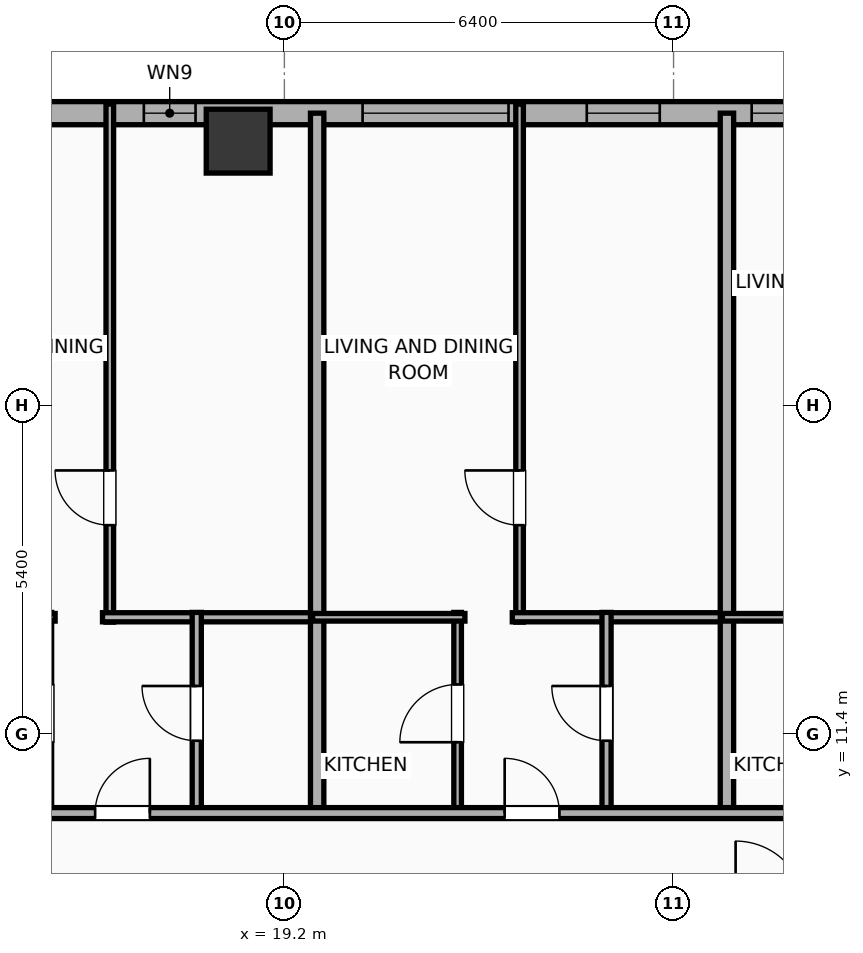
"""IFC4 building model, lengths in metres.
Left out: names, types, materials, properties, quantities, classifications, styles, units other than length and angle.
Written with IfcOpenShell. Run it as: python <this file> out.ifc"""

import sys

from ifc_helpers import new_model, si_unit, direction, frame, frame_2d, origin, origin_2d, place, context, subcontext, project, spatial, rectangle, hollow_rectangle, extrude, element, fill, save


model = new_model("IFC4")
c1 = context("Model", 3, precision=1e-05, world=origin(), true_north=direction((0.0, 1.0)))
c2 = subcontext(c1, "Body", "Model", "MODEL_VIEW")
j1 = project(units=[si_unit("LENGTHUNIT", "METRE"), si_unit("PLANEANGLEUNIT", "RADIAN")], contexts=[c1])
p1 = place(None, origin())
s1 = spatial("IfcSite", under=j1, at=p1, CompositionType="ELEMENT")
p2 = place(p1, origin())
s2 = spatial("IfcBuilding", under=s1, at=p2, CompositionType="ELEMENT")
p3 = place(p2, frame((0.0, 0.0, 124.8)))
s3 = spatial("IfcBuildingStorey", under=s2, at=p3, CompositionType="ELEMENT", Elevation=124.8)
p4 = place(p3, frame((18.44, 21.15, 0.0), z_axis=(0.0, 0.0, 1.0), x_axis=(1.0, 0.0, 0.0)))
e1 = element("IfcColumn", 1, at=p4, inside=s3, PredefinedType="COLUMN", context=c2, shape_type="SweptSolid", body=[
    extrude(hollow_rectangle(XDim=1.05, YDim=1.05, WallThickness=0.036, at=origin_2d()), origin(), (0.0, 0.0, 1.0), 3.9),
])
p5 = place(p3, frame((-25.381, 21.61, 0.0), z_axis=(0.0, 0.0, 1.0), x_axis=(1.0, 0.0, 0.0)))
e2 = element("IfcWall", 2, at=p5, inside=s3, PredefinedType="ELEMENTEDWALL", context=c2, shape_type="SweptSolid", body=[
    extrude(rectangle(XDim=54.763, YDim=0.38, at=frame_2d((27.381, 0.0))), origin(), (0.0, 0.0, 1.0), 3.65),
])
p6 = place(p5, frame((4.795, 0.0, 0.75)))
e3 = element("IfcOpeningElement", 3, at=p6, cuts=e2, PredefinedType="OPENING", context=c2, shape_type="SweptSolid", body=[
    extrude(rectangle(XDim=2.4, YDim=2.1, at=frame_2d((1.2, 1.05))), frame((0.0, 0.2, 0.0), z_axis=(0.0, -1.0, 0.0), x_axis=(1.0, 0.0, 0.0)), (0.0, 0.0, 1.0), 0.4),
])
p7 = place(p5, frame((45.867, 0.0, 0.75)))
e4 = element("IfcOpeningElement", 4, at=p7, cuts=e2, PredefinedType="OPENING", context=c2, shape_type="SweptSolid", body=[
    extrude(rectangle(XDim=2.4, YDim=2.1, at=frame_2d((1.2, 1.05))), frame((0.0, 0.2, 0.0), z_axis=(0.0, -1.0, 0.0), x_axis=(1.0, 0.0, 0.0)), (0.0, 0.0, 1.0), 0.4),
])
p8 = place(p5, frame((2.408, 0.0, 0.75)))
e5 = element("IfcOpeningElement", 5, at=p8, cuts=e2, PredefinedType="OPENING", context=c2, shape_type="SweptSolid", body=[
    extrude(rectangle(XDim=1.2, YDim=2.05, at=frame_2d((0.6, 1.025))), frame((0.0, 0.2, 0.0), z_axis=(0.0, -1.0, 0.0), x_axis=(1.0, 0.0, 0.0)), (0.0, 0.0, 1.0), 0.4),
])
p9 = place(p5, frame((8.952, 0.0, 0.75)))
e6 = element("IfcOpeningElement", 6, at=p9, cuts=e2, PredefinedType="OPENING", context=c2, shape_type="SweptSolid", body=[
    extrude(rectangle(XDim=1.2, YDim=2.05, at=frame_2d((0.6, 1.025))), frame((0.0, 0.2, 0.0), z_axis=(0.0, -1.0, 0.0), x_axis=(1.0, 0.0, 0.0)), (0.0, 0.0, 1.0), 0.4),
])
p10 = place(p5, frame((17.132, 0.0, 0.75)))
e7 = element("IfcOpeningElement", 7, at=p10, cuts=e2, PredefinedType="OPENING", context=c2, shape_type="SweptSolid", body=[
    extrude(rectangle(XDim=1.2, YDim=2.05, at=frame_2d((0.6, 1.025))), frame((0.0, 0.2, 0.0), z_axis=(0.0, -1.0, 0.0), x_axis=(1.0, 0.0, 0.0)), (0.0, 0.0, 1.0), 0.4),
])
p11 = place(p5, frame((14.007, 0.0, 0.75)))
e8 = element("IfcOpeningElement", 8, at=p11, cuts=e2, PredefinedType="OPENING", context=c2, shape_type="SweptSolid", body=[
    extrude(rectangle(XDim=1.2, YDim=2.05, at=frame_2d((0.6, 1.025))), frame((0.0, 0.2, 0.0), z_axis=(0.0, -1.0, 0.0), x_axis=(1.0, 0.0, 0.0)), (0.0, 0.0, 1.0), 0.4),
])
p12 = place(p5, frame((22.636, 0.0, 0.75)))
e9 = element("IfcOpeningElement", 9, at=p12, cuts=e2, PredefinedType="OPENING", context=c2, shape_type="SweptSolid", body=[
    extrude(rectangle(XDim=1.2, YDim=2.05, at=frame_2d((0.6, 1.025))), frame((0.0, 0.2, 0.0), z_axis=(0.0, -1.0, 0.0), x_axis=(1.0, 0.0, 0.0)), (0.0, 0.0, 1.0), 0.4),
])
p13 = place(p5, frame((27.129, 0.0, 0.75)))
e10 = element("IfcOpeningElement", 10, at=p13, cuts=e2, PredefinedType="OPENING", context=c2, shape_type="SweptSolid", body=[
    extrude(rectangle(XDim=1.2, YDim=2.05, at=frame_2d((0.6, 1.025))), frame((0.0, 0.2, 0.0), z_axis=(0.0, -1.0, 0.0), x_axis=(1.0, 0.0, 0.0)), (0.0, 0.0, 1.0), 0.4),
])
p14 = place(p5, frame((30.254, 0.0, 0.75)))
e11 = element("IfcOpeningElement", 11, at=p14, cuts=e2, PredefinedType="OPENING", context=c2, shape_type="SweptSolid", body=[
    extrude(rectangle(XDim=1.2, YDim=2.05, at=frame_2d((0.6, 1.025))), frame((0.0, 0.2, 0.0), z_axis=(0.0, -1.0, 0.0), x_axis=(1.0, 0.0, 0.0)), (0.0, 0.0, 1.0), 0.4),
])
p15 = place(p5, frame((33.603, 0.0, 0.75)))
e12 = element("IfcOpeningElement", 12, at=p15, cuts=e2, PredefinedType="OPENING", context=c2, shape_type="SweptSolid", body=[
    extrude(rectangle(XDim=1.2, YDim=2.05, at=frame_2d((0.6, 1.025))), frame((0.0, 0.2, 0.0), z_axis=(0.0, -1.0, 0.0), x_axis=(1.0, 0.0, 0.0)), (0.0, 0.0, 1.0), 0.4),
])
p16 = place(p5, frame((36.608, 0.0, 0.75)))
e13 = element("IfcOpeningElement", 13, at=p16, cuts=e2, PredefinedType="OPENING", context=c2, shape_type="SweptSolid", body=[
    extrude(rectangle(XDim=1.2, YDim=2.05, at=frame_2d((0.6, 1.025))), frame((0.0, 0.2, 0.0), z_axis=(0.0, -1.0, 0.0), x_axis=(1.0, 0.0, 0.0)), (0.0, 0.0, 1.0), 0.4),
])
p17 = place(p5, frame((39.446, 0.0, 0.75)))
e14 = element("IfcOpeningElement", 14, at=p17, cuts=e2, PredefinedType="OPENING", context=c2, shape_type="SweptSolid", body=[
    extrude(rectangle(XDim=1.2, YDim=2.05, at=frame_2d((0.6, 1.025))), frame((0.0, 0.2, 0.0), z_axis=(0.0, -1.0, 0.0), x_axis=(1.0, 0.0, 0.0)), (0.0, 0.0, 1.0), 0.4),
])
p18 = place(p5, frame((42.27, 0.0, 0.75)))
e15 = element("IfcOpeningElement", 15, at=p18, cuts=e2, PredefinedType="OPENING", context=c2, shape_type="SweptSolid", body=[
    extrude(rectangle(XDim=0.85, YDim=2.05, at=frame_2d((0.425, 1.025))), frame((0.0, 0.2, 0.0), z_axis=(0.0, -1.0, 0.0), x_axis=(1.0, 0.0, 0.0)), (0.0, 0.0, 1.0), 0.4),
])
p19 = place(p5, frame((49.554, 0.0, 0.75)))
e16 = element("IfcOpeningElement", 16, at=p19, cuts=e2, PredefinedType="OPENING", context=c2, shape_type="SweptSolid", body=[
    extrude(rectangle(XDim=1.2, YDim=2.05, at=frame_2d((0.6, 1.025))), frame((0.0, 0.2, 0.0), z_axis=(0.0, -1.0, 0.0), x_axis=(1.0, 0.0, 0.0)), (0.0, 0.0, 1.0), 0.4),
])
p20 = place(p5, frame((52.266, 0.0, 0.75)))
e17 = element("IfcOpeningElement", 17, at=p20, cuts=e2, PredefinedType="OPENING", context=c2, shape_type="SweptSolid", body=[
    extrude(rectangle(XDim=1.2, YDim=2.05, at=frame_2d((0.6, 1.025))), frame((0.0, 0.2, 0.0), z_axis=(0.0, -1.0, 0.0), x_axis=(1.0, 0.0, 0.0)), (0.0, 0.0, 1.0), 0.4),
])
p21 = place(p3, frame((16.329, 13.24, 0.0), z_axis=(0.0, 0.0, 1.0), x_axis=(0.0, 1.0, 0.0)))
e18 = element("IfcWall", 18, at=p21, inside=s3, PredefinedType="PARTITIONING", context=c2, shape_type="SweptSolid", body=[
    extrude(rectangle(XDim=8.52, YDim=0.125, at=frame_2d((4.26, 0.0))), origin(), (0.0, 0.0, 1.0), 3.65),
])
p22 = place(p21, frame((1.595, 0.0, 0.0)))
e19 = element("IfcOpeningElement", 19, at=p22, cuts=e18, PredefinedType="OPENING", context=c2, shape_type="SweptSolid", body=[
    extrude(rectangle(XDim=0.9, YDim=2.05, at=frame_2d((0.45, 1.025))), frame((0.0, 0.073, 0.0), z_axis=(0.0, -1.0, 0.0), x_axis=(1.0, 0.0, 0.0)), (0.0, 0.0, 1.0), 0.145),
])
p23 = place(p3, frame((16.209, 13.32, 0.0), z_axis=(0.0, 0.0, 1.0), x_axis=(1.0, 0.0, 0.0)))
e20 = element("IfcWall", 20, at=p23, inside=s3, PredefinedType="PLUMBINGWALL", context=c2, shape_type="SweptSolid", body=[
    extrude(rectangle(XDim=3.605, YDim=0.15, at=frame_2d((1.802, 0.0))), origin(), (0.0, 0.0, 1.0), 3.65),
])
p24 = place(p3, frame((12.74, 13.32, 0.0), z_axis=(0.0, 0.0, 1.0), x_axis=(1.0, 0.0, 0.0)))
e21 = element("IfcWall", 21, at=p24, inside=s3, PredefinedType="PARTITIONING", context=c2, shape_type="SweptSolid", body=[
    extrude(rectangle(XDim=2.69, YDim=0.125, at=frame_2d((1.345, 0.0))), origin(), (0.0, 0.0, 1.0), 3.65),
])
p25 = place(p3, frame((17.759, 10.08, 0.0), z_axis=(0.0, 0.0, 1.0), x_axis=(0.0, 1.0, 0.0)))
e22 = element("IfcWall", 22, at=p25, inside=s3, PredefinedType="PLUMBINGWALL", context=c2, shape_type="SweptSolid", body=[
    extrude(rectangle(XDim=3.32, YDim=0.15, at=frame_2d((1.66, 0.0))), origin(), (0.0, 0.0, 1.0), 3.65),
])
p26 = place(p25, frame((1.21, 0.0, 0.0)))
e23 = element("IfcOpeningElement", 23, at=p26, cuts=e22, PredefinedType="OPENING", context=c2, shape_type="SweptSolid", body=[
    extrude(rectangle(XDim=0.9, YDim=2.05, at=frame_2d((0.45, 1.025))), frame((0.0, 0.085, 0.0), z_axis=(0.0, -1.0, 0.0), x_axis=(1.0, 0.0, 0.0)), (0.0, 0.0, 1.0), 0.17),
])
p27 = place(p3, frame((19.739, 10.02, 0.0), z_axis=(0.0, 0.0, 1.0), x_axis=(0.0, 1.0, 0.0)))
e24 = element("IfcWall", 24, at=p27, inside=s3, PredefinedType="PARTITIONING", context=c2, shape_type="SweptSolid", body=[
    extrude(rectangle(XDim=11.59, YDim=0.22, at=frame_2d((5.795, 0.0))), origin(), (0.0, 0.0, 1.0), 3.65),
])
p28 = place(p3, frame((23.068, 13.24, 0.0), z_axis=(0.0, 0.0, 1.0), x_axis=(0.0, 1.0, 0.0)))
e25 = element("IfcWall", 25, at=p28, inside=s3, PredefinedType="PARTITIONING", context=c2, shape_type="SweptSolid", body=[
    extrude(rectangle(XDim=8.52, YDim=0.125, at=frame_2d((4.26, 0.0))), origin(), (0.0, 0.0, 1.0), 3.65),
])
p29 = place(p28, frame((1.595, 0.0, 0.0)))
e26 = element("IfcOpeningElement", 26, at=p29, cuts=e25, PredefinedType="OPENING", context=c2, shape_type="SweptSolid", body=[
    extrude(rectangle(XDim=0.9, YDim=2.05, at=frame_2d((0.45, 1.025))), frame((0.0, 0.073, 0.0), z_axis=(0.0, -1.0, 0.0), x_axis=(1.0, 0.0, 0.0)), (0.0, 0.0, 1.0), 0.145),
])
p30 = place(p3, frame((22.948, 13.32, 0.0), z_axis=(0.0, 0.0, 1.0), x_axis=(1.0, 0.0, 0.0)))
e27 = element("IfcWall", 27, at=p30, inside=s3, PredefinedType="PLUMBINGWALL", context=c2, shape_type="SweptSolid", body=[
    extrude(rectangle(XDim=3.605, YDim=0.15, at=frame_2d((1.802, 0.0))), origin(), (0.0, 0.0, 1.0), 3.65),
])
p31 = place(p3, frame((22.049, 10.08, 0.0), z_axis=(0.0, 0.0, 1.0), x_axis=(0.0, 1.0, 0.0)))
e28 = element("IfcWall", 28, at=p31, inside=s3, PredefinedType="PARTITIONING", context=c2, shape_type="SweptSolid", body=[
    extrude(rectangle(XDim=3.32, YDim=0.125, at=frame_2d((1.66, 0.0))), origin(), (0.0, 0.0, 1.0), 3.65),
])
p32 = place(p31, frame((1.185, 0.0, 0.0)))
e29 = element("IfcOpeningElement", 29, at=p32, cuts=e28, PredefinedType="OPENING", context=c2, shape_type="SweptSolid", body=[
    extrude(rectangle(XDim=0.95, YDim=2.05, at=frame_2d((0.475, 1.025))), frame((0.0, 0.073, 0.0), z_axis=(0.0, -1.0, 0.0), x_axis=(1.0, 0.0, 0.0)), (0.0, 0.0, 1.0), 0.145),
])
p33 = place(p3, frame((19.664, 13.32, 0.0), z_axis=(0.0, 0.0, 1.0), x_axis=(1.0, 0.0, 0.0)))
e30 = element("IfcWall", 30, at=p33, inside=s3, PredefinedType="PARTITIONING", context=c2, shape_type="SweptSolid", body=[
    extrude(rectangle(XDim=2.505, YDim=0.125, at=frame_2d((1.252, 0.0))), origin(), (0.0, 0.0, 1.0), 3.65),
])
p34 = place(p3, frame((24.498, 10.08, 0.0), z_axis=(0.0, 0.0, 1.0), x_axis=(0.0, 1.0, 0.0)))
e31 = element("IfcWall", 31, at=p34, inside=s3, PredefinedType="PLUMBINGWALL", context=c2, shape_type="SweptSolid", body=[
    extrude(rectangle(XDim=3.32, YDim=0.15, at=frame_2d((1.66, 0.0))), origin(), (0.0, 0.0, 1.0), 3.65),
])
p35 = place(p34, frame((1.21, 0.0, 0.0)))
e32 = element("IfcOpeningElement", 32, at=p35, cuts=e31, PredefinedType="OPENING", context=c2, shape_type="SweptSolid", body=[
    extrude(rectangle(XDim=0.9, YDim=2.05, at=frame_2d((0.45, 1.025))), frame((0.0, 0.085, 0.0), z_axis=(0.0, -1.0, 0.0), x_axis=(1.0, 0.0, 0.0)), (0.0, 0.0, 1.0), 0.17),
])
p36 = place(p3, frame((26.478, 10.02, 0.0), z_axis=(0.0, 0.0, 1.0), x_axis=(0.0, 1.0, 0.0)))
e33 = element("IfcWall", 33, at=p36, inside=s3, PredefinedType="PARTITIONING", context=c2, shape_type="SweptSolid", body=[
    extrude(rectangle(XDim=11.59, YDim=0.22, at=frame_2d((5.795, 0.0))), origin(), (0.0, 0.0, 1.0), 3.65),
])
p37 = place(p3, frame((26.403, 13.32, 0.0), z_axis=(0.0, 0.0, 1.0), x_axis=(1.0, 0.0, 0.0)))
e34 = element("IfcWall", 34, at=p37, inside=s3, PredefinedType="PARTITIONING", context=c2, shape_type="SweptSolid", body=[
    extrude(rectangle(XDim=2.505, YDim=0.125, at=frame_2d((1.252, 0.0))), origin(), (0.0, 0.0, 1.0), 3.65),
])
p38 = place(p3, frame((-29.21, 10.1, 0.0), z_axis=(0.0, 0.0, 1.0), x_axis=(1.0, 0.0, 0.0)))
e35 = element("IfcWall", 35, at=p38, inside=s3, PredefinedType="PARTITIONING", context=c2, shape_type="SweptSolid", body=[
    extrude(rectangle(XDim=62.42, YDim=0.18, at=frame_2d((31.21, 0.0))), origin(), (0.0, 0.0, 1.0), 3.65),
])
p39 = place(p38, frame((2.54, 0.0, 0.0)))
e36 = element("IfcOpeningElement", 36, at=p39, cuts=e35, PredefinedType="OPENING", context=c2, shape_type="SweptSolid", body=[
    extrude(rectangle(XDim=0.9, YDim=2.05, at=frame_2d((0.45, 1.025))), frame((0.0, 0.1, 0.0), z_axis=(0.0, -1.0, 0.0), x_axis=(1.0, 0.0, 0.0)), (0.0, 0.0, 1.0), 0.2),
])
p40 = place(p38, frame((9.1, 0.0, 0.0)))
e37 = element("IfcOpeningElement", 37, at=p40, cuts=e35, PredefinedType="OPENING", context=c2, shape_type="SweptSolid", body=[
    extrude(rectangle(XDim=1.15, YDim=2.05, at=frame_2d((0.575, 1.025))), frame((0.0, 0.1, 0.0), z_axis=(0.0, -1.0, 0.0), x_axis=(1.0, 0.0, 0.0)), (0.0, 0.0, 1.0), 0.2),
])
p41 = place(p38, frame((14.063, 0.0, 0.0)))
e38 = element("IfcOpeningElement", 38, at=p41, cuts=e35, PredefinedType="OPENING", context=c2, shape_type="SweptSolid", body=[
    extrude(rectangle(XDim=0.9, YDim=2.05, at=frame_2d((0.45, 1.025))), frame((0.0, 0.1, 0.0), z_axis=(0.0, -1.0, 0.0), x_axis=(1.0, 0.0, 0.0)), (0.0, 0.0, 1.0), 0.2),
])
p42 = place(p38, frame((20.954, 0.0, 0.0)))
e39 = element("IfcOpeningElement", 39, at=p42, cuts=e35, PredefinedType="OPENING", context=c2, shape_type="SweptSolid", body=[
    extrude(rectangle(XDim=1.15, YDim=2.05, at=frame_2d((0.575, 1.025))), frame((0.0, 0.1, 0.0), z_axis=(0.0, -1.0, 0.0), x_axis=(1.0, 0.0, 0.0)), (0.0, 0.0, 1.0), 0.2),
])
p43 = place(p38, frame((26.26, 0.0, 0.0)))
e40 = element("IfcOpeningElement", 40, at=p43, cuts=e35, PredefinedType="OPENING", context=c2, shape_type="SweptSolid", body=[
    extrude(rectangle(XDim=0.9, YDim=2.05, at=frame_2d((0.45, 1.025))), frame((0.0, 0.1, 0.0), z_axis=(0.0, -1.0, 0.0), x_axis=(1.0, 0.0, 0.0)), (0.0, 0.0, 1.0), 0.2),
])
p44 = place(p38, frame((31.01, 0.0, 0.0)))
e41 = element("IfcOpeningElement", 41, at=p44, cuts=e35, PredefinedType="OPENING", context=c2, shape_type="SweptSolid", body=[
    extrude(rectangle(XDim=1.15, YDim=2.05, at=frame_2d((0.575, 1.025))), frame((0.0, 0.1, 0.0), z_axis=(0.0, -1.0, 0.0), x_axis=(1.0, 0.0, 0.0)), (0.0, 0.0, 1.0), 0.2),
])
p45 = place(p38, frame((37.37, 0.0, 0.0)))
e42 = element("IfcOpeningElement", 42, at=p45, cuts=e35, PredefinedType="OPENING", context=c2, shape_type="SweptSolid", body=[
    extrude(rectangle(XDim=1.15, YDim=2.05, at=frame_2d((0.575, 1.025))), frame((0.0, 0.1, 0.0), z_axis=(0.0, -1.0, 0.0), x_axis=(1.0, 0.0, 0.0)), (0.0, 0.0, 1.0), 0.2),
])
p46 = place(p38, frame((45.298, 0.0, 0.0)))
e43 = element("IfcOpeningElement", 43, at=p46, cuts=e35, PredefinedType="OPENING", context=c2, shape_type="SweptSolid", body=[
    extrude(rectangle(XDim=0.9, YDim=2.05, at=frame_2d((0.45, 1.025))), frame((0.0, 0.1, 0.0), z_axis=(0.0, -1.0, 0.0), x_axis=(1.0, 0.0, 0.0)), (0.0, 0.0, 1.0), 0.2),
])
p47 = place(p38, frame((52.033, 0.0, 0.0)))
e44 = element("IfcOpeningElement", 44, at=p47, cuts=e35, PredefinedType="OPENING", context=c2, shape_type="SweptSolid", body=[
    extrude(rectangle(XDim=0.9, YDim=2.05, at=frame_2d((0.45, 1.025))), frame((0.0, 0.1, 0.0), z_axis=(0.0, -1.0, 0.0), x_axis=(1.0, 0.0, 0.0)), (0.0, 0.0, 1.0), 0.2),
])
p48 = place(p38, frame((58.805, 0.0, 0.0)))
e45 = element("IfcOpeningElement", 45, at=p48, cuts=e35, PredefinedType="OPENING", context=c2, shape_type="SweptSolid", body=[
    extrude(rectangle(XDim=0.9, YDim=2.05, at=frame_2d((0.45, 1.025))), frame((0.0, 0.1, 0.0), z_axis=(0.0, -1.0, 0.0), x_axis=(1.0, 0.0, 0.0)), (0.0, 0.0, 1.0), 0.2),
])
p49 = place(p7, origin())
e46 = element("IfcWindow", 46, at=p49, inside=s3, PartitioningType="SINGLE_PANEL", PredefinedType="WINDOW", context=c2, shape_type="SweptSolid", body=[
    extrude(rectangle(XDim=2.4, YDim=2.1, at=frame_2d((1.2, 1.05))), frame((0.0, 0.03, 0.0), z_axis=(0.0, -1.0, 0.0), x_axis=(1.0, 0.0, 0.0)), (0.0, 0.0, 1.0), 0.06),
])
fill(e4, e46)
p50 = place(p18, origin())
e47 = element("IfcWindow", 47, at=p50, inside=s3, PartitioningType="SINGLE_PANEL", PredefinedType="WINDOW", context=c2, shape_type="SweptSolid", body=[
    extrude(rectangle(XDim=0.85, YDim=2.05, at=frame_2d((0.425, 1.025))), frame((0.0, 0.03, 0.0), z_axis=(0.0, -1.0, 0.0), x_axis=(1.0, 0.0, 0.0)), (0.0, 0.0, 1.0), 0.06),
])
fill(e15, e47)
p51 = place(p19, origin())
e48 = element("IfcWindow", 48, at=p51, inside=s3, PartitioningType="SINGLE_PANEL", PredefinedType="WINDOW", context=c2, shape_type="SweptSolid", body=[
    extrude(rectangle(XDim=1.2, YDim=2.05, at=frame_2d((0.6, 1.025))), frame((0.0, 0.03, 0.0), z_axis=(0.0, -1.0, 0.0), x_axis=(1.0, 0.0, 0.0)), (0.0, 0.0, 1.0), 0.06),
])
fill(e16, e48)
p52 = place(p20, origin())
e49 = element("IfcWindow", 49, at=p52, inside=s3, PartitioningType="SINGLE_PANEL", PredefinedType="WINDOW", context=c2, shape_type="SweptSolid", body=[
    extrude(rectangle(XDim=1.2, YDim=2.05, at=frame_2d((0.6, 1.025))), frame((0.0, 0.03, 0.0), z_axis=(0.0, -1.0, 0.0), x_axis=(1.0, 0.0, 0.0)), (0.0, 0.0, 1.0), 0.06),
])
fill(e17, e49)
p53 = place(p22, origin())
e50 = element("IfcDoor", 50, at=p53, inside=s3, OperationType="SINGLE_SWING_RIGHT", PredefinedType="DOOR", context=c2, shape_type="SweptSolid", body=[
    extrude(rectangle(XDim=0.9, YDim=2.05, at=frame_2d((0.45, 1.025))), frame((0.0, 0.025, 0.0), z_axis=(0.0, -1.0, 0.0), x_axis=(1.0, 0.0, 0.0)), (0.0, 0.0, 1.0), 0.05),
])
fill(e19, e50)
p54 = place(p26, origin())
e51 = element("IfcDoor", 51, at=p54, inside=s3, OperationType="SINGLE_SWING_RIGHT", PredefinedType="DOOR", context=c2, shape_type="SweptSolid", body=[
    extrude(rectangle(XDim=0.9, YDim=2.05, at=frame_2d((0.45, 1.025))), frame((0.0, 0.025, 0.0), z_axis=(0.0, -1.0, 0.0), x_axis=(1.0, 0.0, 0.0)), (0.0, 0.0, 1.0), 0.05),
])
fill(e23, e51)
p55 = place(p29, origin())
e52 = element("IfcDoor", 52, at=p55, inside=s3, OperationType="SINGLE_SWING_RIGHT", PredefinedType="DOOR", context=c2, shape_type="SweptSolid", body=[
    extrude(rectangle(XDim=0.9, YDim=2.05, at=frame_2d((0.45, 1.025))), frame((0.0, 0.025, 0.0), z_axis=(0.0, -1.0, 0.0), x_axis=(1.0, 0.0, 0.0)), (0.0, 0.0, 1.0), 0.05),
])
fill(e26, e52)
p56 = place(p32, origin())
e53 = element("IfcDoor", 53, at=p56, inside=s3, OperationType="SINGLE_SWING_LEFT", PredefinedType="DOOR", context=c2, shape_type="SweptSolid", body=[
    extrude(rectangle(XDim=0.95, YDim=2.05, at=frame_2d((0.475, 1.025))), frame((0.0, 0.025, 0.0), z_axis=(0.0, -1.0, 0.0), x_axis=(1.0, 0.0, 0.0)), (0.0, 0.0, 1.0), 0.05),
])
fill(e29, e53)
p57 = place(p35, origin())
e54 = element("IfcDoor", 54, at=p57, inside=s3, OperationType="SINGLE_SWING_RIGHT", PredefinedType="DOOR", context=c2, shape_type="SweptSolid", body=[
    extrude(rectangle(XDim=0.9, YDim=2.05, at=frame_2d((0.45, 1.025))), frame((0.0, 0.025, 0.0), z_axis=(0.0, -1.0, 0.0), x_axis=(1.0, 0.0, 0.0)), (0.0, 0.0, 1.0), 0.05),
])
fill(e32, e54)
p58 = place(p46, origin())
e55 = element("IfcDoor", 55, at=p58, inside=s3, OperationType="SINGLE_SWING_RIGHT", PredefinedType="DOOR", context=c2, shape_type="SweptSolid", body=[
    extrude(rectangle(XDim=0.9, YDim=2.05, at=frame_2d((0.45, 1.025))), frame((0.0, 0.025, 0.0), z_axis=(0.0, -1.0, 0.0), x_axis=(1.0, 0.0, 0.0)), (0.0, 0.0, 1.0), 0.05),
])
fill(e43, e55)
p59 = place(p47, origin())
e56 = element("IfcDoor", 56, at=p59, inside=s3, OperationType="SINGLE_SWING_LEFT", PredefinedType="DOOR", context=c2, shape_type="SweptSolid", body=[
    extrude(rectangle(XDim=0.9, YDim=2.05, at=frame_2d((0.45, 1.025))), frame((0.0, 0.025, 0.0), z_axis=(0.0, -1.0, 0.0), x_axis=(1.0, 0.0, 0.0)), (0.0, 0.0, 1.0), 0.05),
])
fill(e44, e56)
save(model, sys.argv[1])
